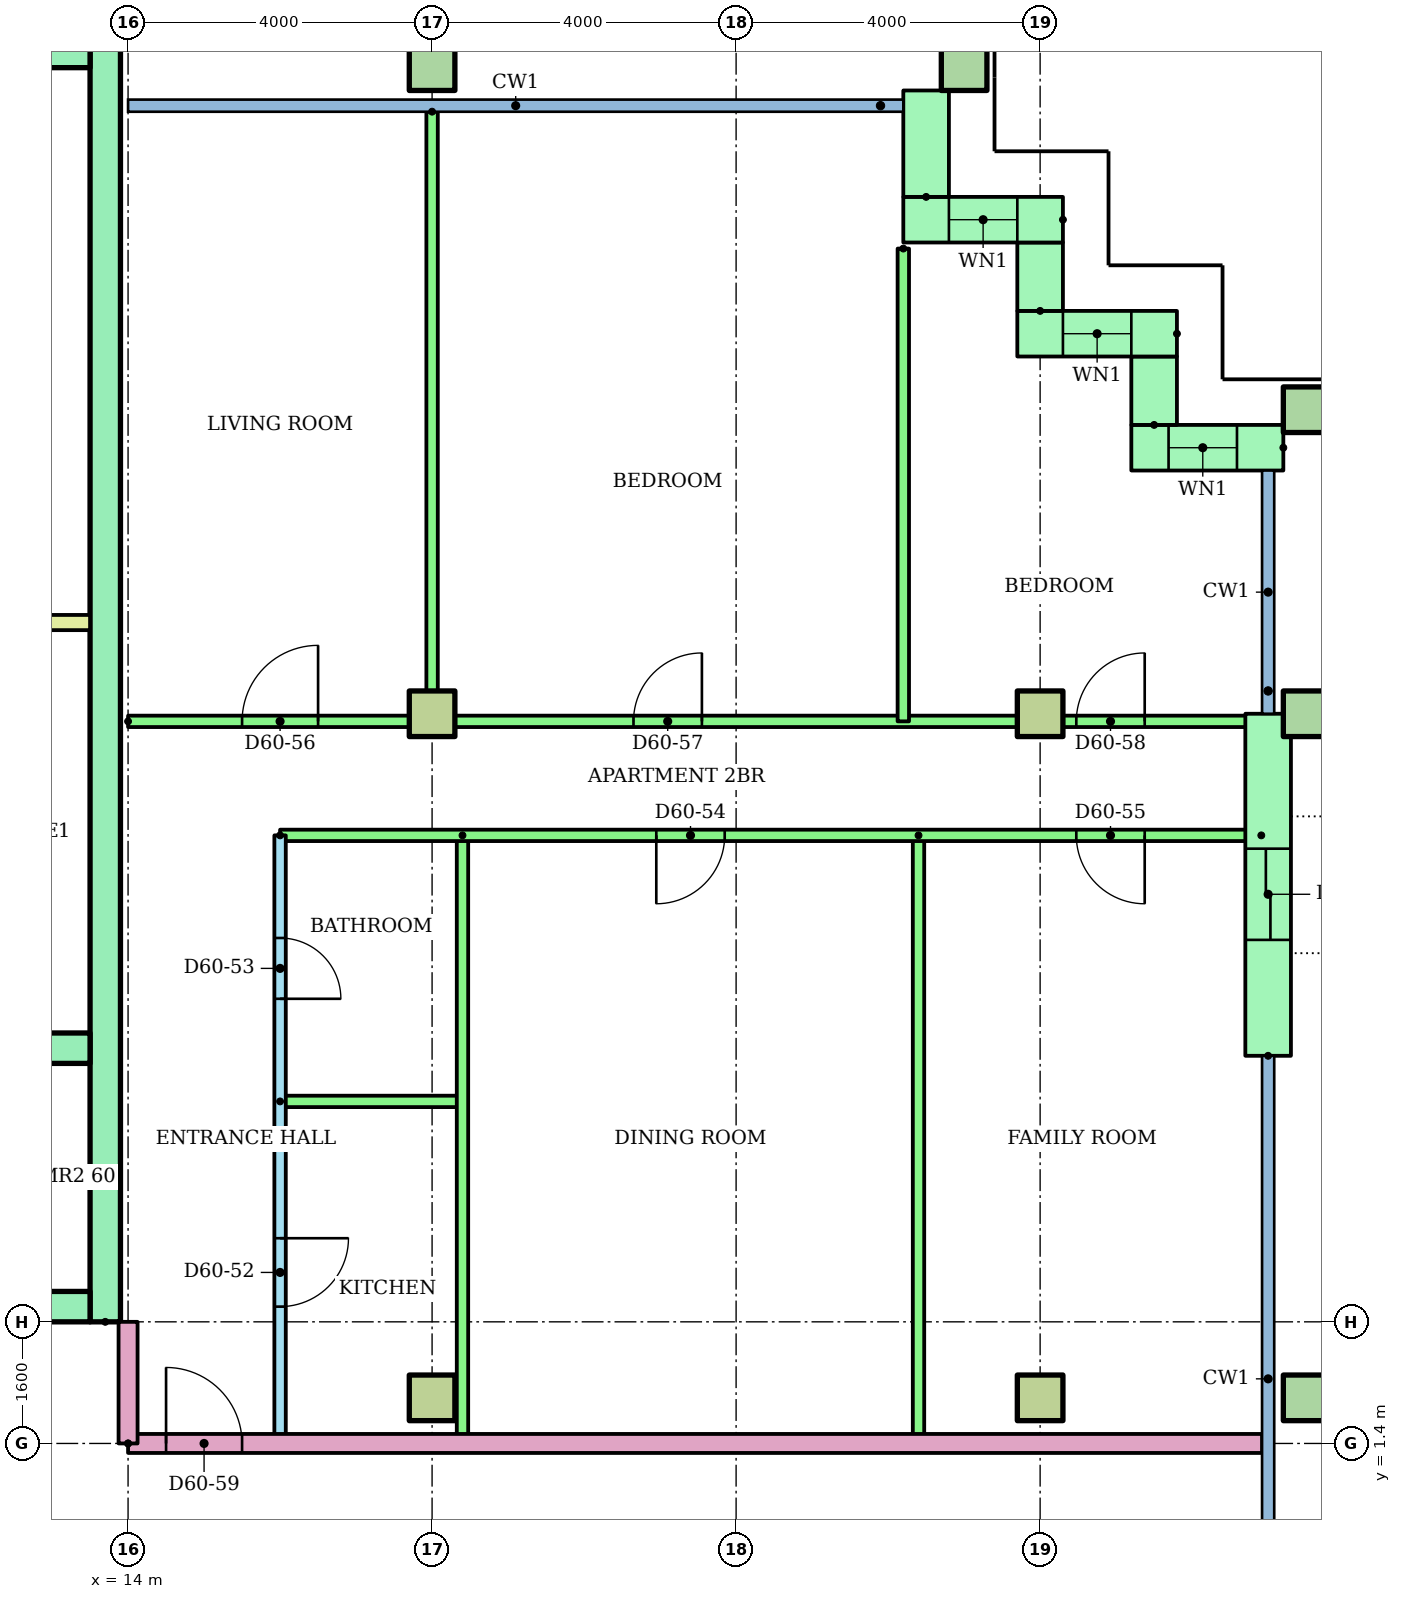
"""IFC4 building model, lengths in metres.
Left out: names, types, materials, properties, quantities, classifications, styles, units other than length and angle.
Written with IfcOpenShell. Run it as: python <this file> out.ifc"""

import sys

from ifc_helpers import new_model, si_unit, direction, frame, frame_2d, origin, origin_2d, place, context, subcontext, project, spatial, rectangle, hollow_rectangle, extrude, element, fill, save


model = new_model("IFC4")
c1 = context("Model", 3, precision=1e-05, world=origin(), true_north=direction((0.0, 1.0)))
c2 = subcontext(c1, "Body", "Model", "MODEL_VIEW")
j1 = project(units=[si_unit("LENGTHUNIT", "METRE"), si_unit("PLANEANGLEUNIT", "RADIAN")], contexts=[c1])
p1 = place(None, origin())
s1 = spatial("IfcSite", under=j1, at=p1, CompositionType="ELEMENT")
p2 = place(p1, origin())
s2 = spatial("IfcBuilding", under=s1, at=p2, CompositionType="ELEMENT")
p3 = place(p2, frame((0.0, 0.0, 230.0)))
s3 = spatial("IfcBuildingStorey", under=s2, at=p3, CompositionType="ELEMENT", Elevation=230.0)
for number, where in (
    (1, (18.0, 2.0, 0.0)),
    (2, (26.0, 2.0, 0.0)),
):
    element("IfcColumn", number, at=place(p3, frame(where)), inside=s3, PredefinedType="COLUMN", context=c2, shape_type="SweptSolid", body=[
        extrude(rectangle(XDim=0.6, YDim=0.6, at=origin_2d()), origin(), (0.0, 0.0, 1.0), 3.2),
    ])
p4 = place(p3, frame((29.5, 2.0, 0.0)))
e3 = element("IfcColumn", 3, at=p4, inside=s3, PredefinedType="COLUMN", context=c2, shape_type="SweptSolid", body=[
    extrude(hollow_rectangle(XDim=0.6, YDim=0.6, WallThickness=0.03, at=origin_2d()), origin(), (0.0, 0.0, 1.0), 3.2),
])
for number, where in (
    (4, (18.0, 11.0, 0.0)),
    (5, (26.0, 11.0, 0.0)),
):
    element("IfcColumn", number, at=place(p3, frame(where)), inside=s3, PredefinedType="COLUMN", context=c2, shape_type="SweptSolid", body=[
        extrude(rectangle(XDim=0.6, YDim=0.6, at=origin_2d()), origin(), (0.0, 0.0, 1.0), 3.2),
    ])
for number, where in (
    (6, (29.5, 11.0, 0.0)),
    (7, (29.5, 15.0, 0.0)),
    (8, (18.0, 19.5, 0.0)),
    (9, (25.0, 19.5, 0.0)),
):
    element("IfcColumn", number, at=place(p3, frame(where)), inside=s3, PredefinedType="COLUMN", context=c2, shape_type="SweptSolid", body=[
        extrude(hollow_rectangle(XDim=0.6, YDim=0.6, WallThickness=0.03, at=origin_2d()), origin(), (0.0, 0.0, 1.0), 3.2),
    ])
p5 = place(p3, frame((29.2, 14.5, 0.0), z_axis=(0.0, 0.0, 1.0), x_axis=(-1.0, 0.0, 0.0)))
e10 = element("IfcWall", 10, at=p5, inside=s3, PredefinedType="STANDARD", context=c2, shape_type="SweptSolid", body=[
    extrude(rectangle(XDim=2.0, YDim=0.6, at=frame_2d((1.0, 0.0))), origin(), (0.0, 0.0, 1.0), 2.92),
])
p6 = place(p5, frame((0.61, 0.0, 0.9)))
e11 = element("IfcOpeningElement", 11, at=p6, cuts=e10, PredefinedType="OPENING", context=c2, shape_type="SweptSolid", body=[
    extrude(rectangle(XDim=0.9, YDim=1.5, at=frame_2d((0.45, 0.75))), frame((0.0, 0.31, 0.0), z_axis=(0.0, -1.0, 0.0), x_axis=(1.0, 0.0, 0.0)), (0.0, 0.0, 1.0), 0.62),
])
p7 = place(p3, frame((27.5, 14.8, 0.0), z_axis=(0.0, 0.0, 1.0), x_axis=(0.0, 1.0, 0.0)))
e12 = element("IfcWall", 12, at=p7, inside=s3, PredefinedType="STANDARD", context=c2, shape_type="SweptSolid", body=[
    extrude(rectangle(XDim=0.9, YDim=0.6, at=frame_2d((0.45, 0.0))), origin(), (0.0, 0.0, 1.0), 2.92),
])
p8 = place(p3, frame((27.8, 16.0, 0.0), z_axis=(0.0, 0.0, 1.0), x_axis=(-1.0, 0.0, 0.0)))
e13 = element("IfcWall", 13, at=p8, inside=s3, PredefinedType="STANDARD", context=c2, shape_type="SweptSolid", body=[
    extrude(rectangle(XDim=2.1, YDim=0.6, at=frame_2d((1.05, 0.0))), origin(), (0.0, 0.0, 1.0), 2.92),
])
p9 = place(p8, frame((0.6, 0.0, 0.9)))
e14 = element("IfcOpeningElement", 14, at=p9, cuts=e13, PredefinedType="OPENING", context=c2, shape_type="SweptSolid", body=[
    extrude(rectangle(XDim=0.9, YDim=1.5, at=frame_2d((0.45, 0.75))), frame((0.0, 0.31, 0.0), z_axis=(0.0, -1.0, 0.0), x_axis=(1.0, 0.0, 0.0)), (0.0, 0.0, 1.0), 0.62),
])
p10 = place(p3, frame((26.0, 16.3, 0.0), z_axis=(0.0, 0.0, 1.0), x_axis=(0.0, 1.0, 0.0)))
e15 = element("IfcWall", 15, at=p10, inside=s3, PredefinedType="STANDARD", context=c2, shape_type="SweptSolid", body=[
    extrude(rectangle(XDim=0.9, YDim=0.6, at=frame_2d((0.45, 0.0))), origin(), (0.0, 0.0, 1.0), 2.92),
])
p11 = place(p3, frame((26.3, 17.5, 0.0), z_axis=(0.0, 0.0, 1.0), x_axis=(-1.0, 0.0, 0.0)))
e16 = element("IfcWall", 16, at=p11, inside=s3, PredefinedType="STANDARD", context=c2, shape_type="SweptSolid", body=[
    extrude(rectangle(XDim=2.1, YDim=0.6, at=frame_2d((1.05, 0.0))), origin(), (0.0, 0.0, 1.0), 2.92),
])
p12 = place(p11, frame((0.6, 0.0, 0.9)))
e17 = element("IfcOpeningElement", 17, at=p12, cuts=e16, PredefinedType="OPENING", context=c2, shape_type="SweptSolid", body=[
    extrude(rectangle(XDim=0.9, YDim=1.5, at=frame_2d((0.45, 0.75))), frame((0.0, 0.31, 0.0), z_axis=(0.0, -1.0, 0.0), x_axis=(1.0, 0.0, 0.0)), (0.0, 0.0, 1.0), 0.62),
])
p13 = place(p3, frame((24.5, 17.8, 0.0), z_axis=(0.0, 0.0, 1.0), x_axis=(0.0, 1.0, 0.0)))
e18 = element("IfcWall", 18, at=p13, inside=s3, PredefinedType="STANDARD", context=c2, shape_type="SweptSolid", body=[
    extrude(rectangle(XDim=1.4, YDim=0.6, at=frame_2d((0.7, 0.0))), origin(), (0.0, 0.0, 1.0), 2.92),
])
p14 = place(p3, frame((29.0, 6.5, 0.0), z_axis=(0.0, 0.0, 1.0), x_axis=(0.0, 1.0, 0.0)))
e19 = element("IfcWall", 19, at=p14, inside=s3, PredefinedType="STANDARD", context=c2, shape_type="SweptSolid", body=[
    extrude(rectangle(XDim=4.5, YDim=0.6, at=frame_2d((2.25, 0.0))), origin(), (0.0, 0.0, 1.0), 2.92),
])
p15 = place(p14, frame((1.525, 0.0, 0.0)))
e20 = element("IfcOpeningElement", 20, at=p15, cuts=e19, PredefinedType="OPENING", context=c2, shape_type="SweptSolid", body=[
    extrude(rectangle(XDim=1.2, YDim=2.1, at=frame_2d((0.6, 1.05))), frame((0.0, 0.31, 0.0), z_axis=(0.0, -1.0, 0.0), x_axis=(1.0, 0.0, 0.0)), (0.0, 0.0, 1.0), 0.62),
])
p16 = place(p3, frame((13.7, 3.0, 0.0), z_axis=(0.0, 0.0, 1.0), x_axis=(0.0, 1.0, 0.0)))
e21 = element("IfcWall", 21, at=p16, inside=s3, PredefinedType="SHEAR", context=c2, shape_type="SweptSolid", body=[
    extrude(rectangle(XDim=17.0, YDim=0.4, at=frame_2d((8.5, 0.0))), origin(), (0.0, 0.0, 1.0), 2.92),
])
p17 = place(p3, frame((-13.5, 19.7, 0.0)))
e22 = element("IfcWall", 22, at=p17, inside=s3, PredefinedType="SHEAR", context=c2, shape_type="SweptSolid", body=[
    extrude(rectangle(XDim=27.0, YDim=0.4, at=frame_2d((13.5, 0.0))), origin(), (0.0, 0.0, 1.0), 2.92),
])
p18 = place(p3, frame((-13.5, 3.2, 0.0)))
e23 = element("IfcWall", 23, at=p18, inside=s3, PredefinedType="SHEAR", context=c2, shape_type="SweptSolid", body=[
    extrude(rectangle(XDim=27.0, YDim=0.4, at=frame_2d((13.5, 0.0))), origin(), (0.0, 0.0, 1.0), 2.92),
])
p19 = place(p18, frame((22.083, 0.0, 0.0)))
e24 = element("IfcOpeningElement", 24, at=p19, cuts=e23, PredefinedType="OPENING", context=c2, shape_type="SweptSolid", body=[
    extrude(rectangle(XDim=1.1, YDim=2.1, at=frame_2d((0.55, 1.05))), frame((0.0, 0.21, 0.0), z_axis=(0.0, -1.0, 0.0), x_axis=(1.0, 0.0, 0.0)), (0.0, 0.0, 1.0), 0.42),
])
p20 = place(p18, frame((25.128, 0.0, 0.0)))
e25 = element("IfcOpeningElement", 25, at=p20, cuts=e23, PredefinedType="OPENING", context=c2, shape_type="SweptSolid", body=[
    extrude(rectangle(XDim=1.1, YDim=2.1, at=frame_2d((0.55, 1.05))), frame((0.0, 0.21, 0.0), z_axis=(0.0, -1.0, 0.0), x_axis=(1.0, 0.0, 0.0)), (0.0, 0.0, 1.0), 0.42),
])
p21 = place(p18, frame((12.6, 0.0, 0.0)))
e26 = element("IfcOpeningElement", 26, at=p21, cuts=e23, PredefinedType="OPENING", context=c2, shape_type="SweptSolid", body=[
    extrude(rectangle(XDim=1.8, YDim=2.1, at=frame_2d((0.9, 1.05))), frame((0.0, 0.21, 0.0), z_axis=(0.0, -1.0, 0.0), x_axis=(1.0, 0.0, 0.0)), (0.0, 0.0, 1.0), 0.42),
])
p22 = place(p3, frame((1.522, 6.6, 0.0)))
e27 = element("IfcWall", 27, at=p22, inside=s3, PredefinedType="SHEAR", context=c2, shape_type="SweptSolid", body=[
    extrude(rectangle(XDim=11.978, YDim=0.4, at=frame_2d((5.989, 0.0))), origin(), (0.0, 0.0, 1.0), 2.92),
])
p23 = place(p22, frame((2.544, 0.0, 0.0)))
e28 = element("IfcOpeningElement", 28, at=p23, cuts=e27, PredefinedType="OPENING", context=c2, shape_type="SweptSolid", body=[
    extrude(rectangle(XDim=1.0, YDim=2.1, at=frame_2d((0.5, 1.05))), frame((0.0, 0.21, 0.0), z_axis=(0.0, -1.0, 0.0), x_axis=(1.0, 0.0, 0.0)), (0.0, 0.0, 1.0), 0.42),
])
p24 = place(p3, frame((9.6, 12.2, 0.0)))
e29 = element("IfcWall", 29, at=p24, inside=s3, PredefinedType="PARTITIONING", context=c2, shape_type="SweptSolid", body=[
    extrude(rectangle(XDim=3.9, YDim=0.2, at=frame_2d((1.95, 0.0))), origin(), (0.0, 0.0, 1.0), 2.92),
])
p25 = place(p3, frame((16.0, 9.4, 0.0), z_axis=(0.0, 0.0, 1.0), x_axis=(0.0, -1.0, 0.0)))
e30 = element("IfcWall", 30, at=p25, inside=s3, PredefinedType="PARTITIONING", context=c2, shape_type="SweptSolid", body=[
    extrude(rectangle(XDim=8.0, YDim=0.15, at=frame_2d((4.0, 0.0))), origin(), (0.0, 0.0, 1.0), 2.4),
])
p26 = place(p25, frame((5.3, 0.0, 0.0)))
e31 = element("IfcOpeningElement", 31, at=p26, cuts=e30, PredefinedType="OPENING", context=c2, shape_type="SweptSolid", body=[
    extrude(rectangle(XDim=0.9, YDim=2.1, at=frame_2d((0.45, 1.05))), frame((0.0, 0.085, 0.0), z_axis=(0.0, -1.0, 0.0), x_axis=(1.0, 0.0, 0.0)), (0.0, 0.0, 1.0), 0.17),
])
p27 = place(p25, frame((1.35, 0.0, 0.0)))
e32 = element("IfcOpeningElement", 32, at=p27, cuts=e30, PredefinedType="OPENING", context=c2, shape_type="SweptSolid", body=[
    extrude(rectangle(XDim=0.8, YDim=2.1, at=frame_2d((0.4, 1.05))), frame((0.0, 0.085, 0.0), z_axis=(0.0, -1.0, 0.0), x_axis=(1.0, 0.0, 0.0)), (0.0, 0.0, 1.0), 0.17),
])
p28 = place(p3, frame((16.0, 5.9, 0.0)))
e33 = element("IfcWall", 33, at=p28, inside=s3, PredefinedType="PARTITIONING", context=c2, shape_type="SweptSolid", body=[
    extrude(rectangle(XDim=2.4, YDim=0.15, at=frame_2d((1.2, 0.0))), origin(), (0.0, 0.0, 1.0), 2.4),
])
for number, where, z_axis, x_axis in (
    (34, (18.4, 9.4, 0.0), (0.0, 0.0, 1.0), (0.0, -1.0, 0.0)),
    (35, (24.4, 9.4, 0.0), (0.0, 0.0, 1.0), (0.0, -1.0, 0.0)),
):
    element("IfcWall", number, at=place(p3, frame(where, z_axis=z_axis, x_axis=x_axis)), inside=s3, PredefinedType="PARTITIONING", context=c2, shape_type="SweptSolid", body=[
        extrude(rectangle(XDim=8.0, YDim=0.15, at=frame_2d((4.0, 0.0))), origin(), (0.0, 0.0, 1.0), 2.4),
    ])
p29 = place(p3, frame((28.91, 9.4, 0.0), z_axis=(0.0, 0.0, 1.0), x_axis=(-1.0, 0.0, 0.0)))
e36 = element("IfcWall", 36, at=p29, inside=s3, PredefinedType="PARTITIONING", context=c2, shape_type="SweptSolid", body=[
    extrude(rectangle(XDim=12.91, YDim=0.15, at=frame_2d((6.455, 0.0))), origin(), (0.0, 0.0, 1.0), 2.4),
])
p30 = place(p29, frame((7.06, 0.0, 0.0)))
e37 = element("IfcOpeningElement", 37, at=p30, cuts=e36, PredefinedType="OPENING", context=c2, shape_type="SweptSolid", body=[
    extrude(rectangle(XDim=0.9, YDim=2.1, at=frame_2d((0.45, 1.05))), frame((0.0, 0.085, 0.0), z_axis=(0.0, -1.0, 0.0), x_axis=(1.0, 0.0, 0.0)), (0.0, 0.0, 1.0), 0.17),
])
p31 = place(p29, frame((1.534, 0.0, 0.0)))
e38 = element("IfcOpeningElement", 38, at=p31, cuts=e36, PredefinedType="OPENING", context=c2, shape_type="SweptSolid", body=[
    extrude(rectangle(XDim=0.9, YDim=2.1, at=frame_2d((0.45, 1.05))), frame((0.0, 0.085, 0.0), z_axis=(0.0, -1.0, 0.0), x_axis=(1.0, 0.0, 0.0)), (0.0, 0.0, 1.0), 0.17),
])
p32 = place(p3, frame((14.0, 10.9, 0.0)))
e39 = element("IfcWall", 39, at=p32, inside=s3, PredefinedType="PARTITIONING", context=c2, shape_type="SweptSolid", body=[
    extrude(rectangle(XDim=14.91, YDim=0.15, at=frame_2d((7.455, 0.0))), origin(), (0.0, 0.0, 1.0), 2.4),
])
p33 = place(p32, frame((1.5, 0.0, 0.0)))
e40 = element("IfcOpeningElement", 40, at=p33, cuts=e39, PredefinedType="OPENING", context=c2, shape_type="SweptSolid", body=[
    extrude(rectangle(XDim=1.0, YDim=2.1, at=frame_2d((0.5, 1.05))), frame((0.0, 0.085, 0.0), z_axis=(0.0, -1.0, 0.0), x_axis=(1.0, 0.0, 0.0)), (0.0, 0.0, 1.0), 0.17),
])
p34 = place(p32, frame((6.65, 0.0, 0.0)))
e41 = element("IfcOpeningElement", 41, at=p34, cuts=e39, PredefinedType="OPENING", context=c2, shape_type="SweptSolid", body=[
    extrude(rectangle(XDim=0.9, YDim=2.1, at=frame_2d((0.45, 1.05))), frame((0.0, 0.085, 0.0), z_axis=(0.0, -1.0, 0.0), x_axis=(1.0, 0.0, 0.0)), (0.0, 0.0, 1.0), 0.17),
])
p35 = place(p32, frame((12.476, 0.0, 0.0)))
e42 = element("IfcOpeningElement", 42, at=p35, cuts=e39, PredefinedType="OPENING", context=c2, shape_type="SweptSolid", body=[
    extrude(rectangle(XDim=0.9, YDim=2.1, at=frame_2d((0.45, 1.05))), frame((0.0, 0.085, 0.0), z_axis=(0.0, -1.0, 0.0), x_axis=(1.0, 0.0, 0.0)), (0.0, 0.0, 1.0), 0.17),
])
p36 = place(p3, frame((18.0, 18.921, 0.0), z_axis=(0.0, 0.0, 1.0), x_axis=(0.0, -1.0, 0.0)))
e43 = element("IfcWall", 43, at=p36, inside=s3, PredefinedType="PARTITIONING", context=c2, shape_type="SweptSolid", body=[
    extrude(rectangle(XDim=8.021, YDim=0.15, at=frame_2d((4.01, 0.0))), origin(), (0.0, 0.0, 1.0), 2.4),
])
p37 = place(p3, frame((24.2, 17.12, 0.0), z_axis=(0.0, 0.0, 1.0), x_axis=(0.0, -1.0, 0.0)))
e44 = element("IfcWall", 44, at=p37, inside=s3, PredefinedType="PARTITIONING", context=c2, shape_type="SweptSolid", body=[
    extrude(rectangle(XDim=6.22, YDim=0.15, at=frame_2d((3.11, 0.0))), origin(), (0.0, 0.0, 1.0), 2.4),
])
p38 = place(p3, frame((14.0, 1.4, 0.0)))
e45 = element("IfcWall", 45, at=p38, inside=s3, PredefinedType="PARTITIONING", context=c2, shape_type="SweptSolid", body=[
    extrude(rectangle(XDim=14.92, YDim=0.25, at=frame_2d((7.46, 0.0))), origin(), (0.0, 0.0, 1.0), 2.4),
])
p39 = place(p38, frame((0.5, 0.0, 0.0)))
e46 = element("IfcOpeningElement", 46, at=p39, cuts=e45, PredefinedType="OPENING", context=c2, shape_type="SweptSolid", body=[
    extrude(rectangle(XDim=1.0, YDim=2.1, at=frame_2d((0.5, 1.05))), frame((0.0, 0.135, 0.0), z_axis=(0.0, -1.0, 0.0), x_axis=(1.0, 0.0, 0.0)), (0.0, 0.0, 1.0), 0.27),
])
p40 = place(p3, frame((14.0, 1.4, 0.0), z_axis=(0.0, 0.0, 1.0), x_axis=(0.0, 1.0, 0.0)))
e47 = element("IfcWall", 47, at=p40, inside=s3, PredefinedType="PARTITIONING", context=c2, shape_type="SweptSolid", body=[
    extrude(rectangle(XDim=1.6, YDim=0.25, at=frame_2d((0.8, 0.0))), origin(), (0.0, 0.0, 1.0), 2.4),
])
p41 = place(p6, origin())
e48 = element("IfcWindow", 48, at=p41, inside=s3, PartitioningType="SINGLE_PANEL", PredefinedType="WINDOW", context=c2, shape_type="SweptSolid", body=[
    extrude(rectangle(XDim=0.9, YDim=1.5, at=frame_2d((0.45, 0.75))), frame((0.0, 0.03, 0.0), z_axis=(0.0, -1.0, 0.0), x_axis=(1.0, 0.0, 0.0)), (0.0, 0.0, 1.0), 0.06),
])
fill(e11, e48)
p42 = place(p9, origin())
e49 = element("IfcWindow", 49, at=p42, inside=s3, PartitioningType="SINGLE_PANEL", PredefinedType="WINDOW", context=c2, shape_type="SweptSolid", body=[
    extrude(rectangle(XDim=0.9, YDim=1.5, at=frame_2d((0.45, 0.75))), frame((0.0, 0.03, 0.0), z_axis=(0.0, -1.0, 0.0), x_axis=(1.0, 0.0, 0.0)), (0.0, 0.0, 1.0), 0.06),
])
fill(e14, e49)
p43 = place(p12, origin())
e50 = element("IfcWindow", 50, at=p43, inside=s3, PartitioningType="SINGLE_PANEL", PredefinedType="WINDOW", context=c2, shape_type="SweptSolid", body=[
    extrude(rectangle(XDim=0.9, YDim=1.5, at=frame_2d((0.45, 0.75))), frame((0.0, 0.03, 0.0), z_axis=(0.0, -1.0, 0.0), x_axis=(1.0, 0.0, 0.0)), (0.0, 0.0, 1.0), 0.06),
])
fill(e17, e50)
p44 = place(p26, origin())
e51 = element("IfcDoor", 51, at=p44, inside=s3, OperationType="SINGLE_SWING_LEFT", PredefinedType="DOOR", context=c2, shape_type="SweptSolid", body=[
    extrude(rectangle(XDim=0.9, YDim=2.1, at=frame_2d((0.45, 1.05))), frame((0.0, 0.025, 0.0), z_axis=(0.0, -1.0, 0.0), x_axis=(1.0, 0.0, 0.0)), (0.0, 0.0, 1.0), 0.05),
])
fill(e31, e51)
p45 = place(p27, origin())
e52 = element("IfcDoor", 52, at=p45, inside=s3, OperationType="SINGLE_SWING_RIGHT", PredefinedType="DOOR", context=c2, shape_type="SweptSolid", body=[
    extrude(rectangle(XDim=0.8, YDim=2.1, at=frame_2d((0.4, 1.05))), frame((0.0, 0.025, 0.0), z_axis=(0.0, -1.0, 0.0), x_axis=(1.0, 0.0, 0.0)), (0.0, 0.0, 1.0), 0.05),
])
fill(e32, e52)
p46 = place(p30, origin())
e53 = element("IfcDoor", 53, at=p46, inside=s3, OperationType="SINGLE_SWING_RIGHT", PredefinedType="DOOR", context=c2, shape_type="SweptSolid", body=[
    extrude(rectangle(XDim=0.9, YDim=2.1, at=frame_2d((0.45, 1.05))), frame((0.0, 0.025, 0.0), z_axis=(0.0, -1.0, 0.0), x_axis=(1.0, 0.0, 0.0)), (0.0, 0.0, 1.0), 0.05),
])
fill(e37, e53)
p47 = place(p31, origin())
e54 = element("IfcDoor", 54, at=p47, inside=s3, OperationType="SINGLE_SWING_LEFT", PredefinedType="DOOR", context=c2, shape_type="SweptSolid", body=[
    extrude(rectangle(XDim=0.9, YDim=2.1, at=frame_2d((0.45, 1.05))), frame((0.0, 0.025, 0.0), z_axis=(0.0, -1.0, 0.0), x_axis=(1.0, 0.0, 0.0)), (0.0, 0.0, 1.0), 0.05),
])
fill(e38, e54)
p48 = place(p33, origin())
e55 = element("IfcDoor", 55, at=p48, inside=s3, OperationType="SINGLE_SWING_RIGHT", PredefinedType="DOOR", context=c2, shape_type="SweptSolid", body=[
    extrude(rectangle(XDim=1.0, YDim=2.1, at=frame_2d((0.5, 1.05))), frame((0.0, 0.025, 0.0), z_axis=(0.0, -1.0, 0.0), x_axis=(1.0, 0.0, 0.0)), (0.0, 0.0, 1.0), 0.05),
])
fill(e40, e55)
p49 = place(p34, origin())
e56 = element("IfcDoor", 56, at=p49, inside=s3, OperationType="SINGLE_SWING_RIGHT", PredefinedType="DOOR", context=c2, shape_type="SweptSolid", body=[
    extrude(rectangle(XDim=0.9, YDim=2.1, at=frame_2d((0.45, 1.05))), frame((0.0, 0.025, 0.0), z_axis=(0.0, -1.0, 0.0), x_axis=(1.0, 0.0, 0.0)), (0.0, 0.0, 1.0), 0.05),
])
fill(e41, e56)
p50 = place(p35, origin())
e57 = element("IfcDoor", 57, at=p50, inside=s3, OperationType="SINGLE_SWING_RIGHT", PredefinedType="DOOR", context=c2, shape_type="SweptSolid", body=[
    extrude(rectangle(XDim=0.9, YDim=2.1, at=frame_2d((0.45, 1.05))), frame((0.0, 0.025, 0.0), z_axis=(0.0, -1.0, 0.0), x_axis=(1.0, 0.0, 0.0)), (0.0, 0.0, 1.0), 0.05),
])
fill(e42, e57)
p51 = place(p39, origin())
e58 = element("IfcDoor", 58, at=p51, inside=s3, OperationType="SINGLE_SWING_LEFT", PredefinedType="DOOR", context=c2, shape_type="SweptSolid", body=[
    extrude(rectangle(XDim=1.0, YDim=2.1, at=frame_2d((0.5, 1.05))), frame((0.0, 0.025, 0.0), z_axis=(0.0, -1.0, 0.0), x_axis=(1.0, 0.0, 0.0)), (0.0, 0.0, 1.0), 0.05),
])
fill(e46, e58)
p52 = place(p15, origin())
e59 = element("IfcDoor", 59, at=p52, inside=s3, OperationType="SLIDING_TO_LEFT", PredefinedType="DOOR", context=c2, shape_type="SweptSolid", body=[
    extrude(rectangle(XDim=1.2, YDim=2.1, at=frame_2d((0.6, 1.05))), frame((0.0, 0.025, 0.0), z_axis=(0.0, -1.0, 0.0), x_axis=(1.0, 0.0, 0.0)), (0.0, 0.0, 1.0), 0.05),
])
fill(e20, e59)
save(model, sys.argv[1])
